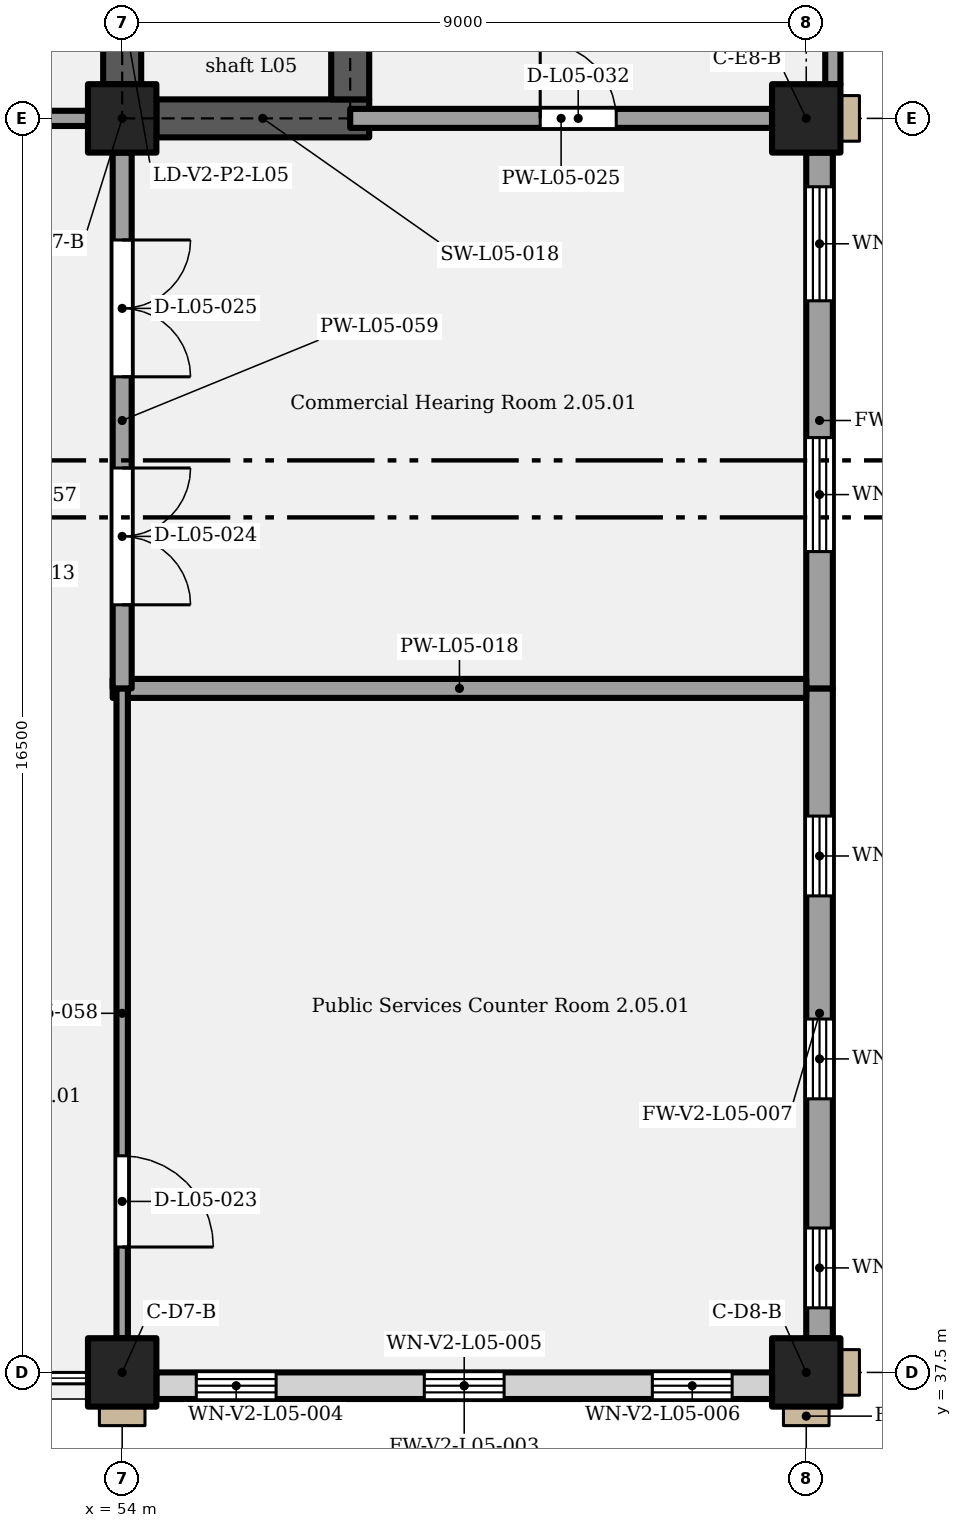
"""IFC4 building model, lengths in metres.
Left out: names, types, materials, properties, quantities, classifications, styles, units other than length and angle.
Written with IfcOpenShell. Run it as: python <this file> out.ifc"""

import sys

from ifc_helpers import new_model, si_unit, direction, frame, frame_2d, origin, origin_2d, place, context, subcontext, project, spatial, rectangle, extrude, element, fill, save


model = new_model("IFC4")
c1 = context("Model", 3, precision=1e-05, world=origin(), true_north=direction((0.0, 1.0)))
c2 = subcontext(c1, "Body", "Model", "MODEL_VIEW")
j1 = project(units=[si_unit("LENGTHUNIT", "METRE"), si_unit("PLANEANGLEUNIT", "RADIAN")], contexts=[c1])
p1 = place(None, origin())
s1 = spatial("IfcSite", under=j1, at=p1, CompositionType="ELEMENT")
p2 = place(p1, origin())
s2 = spatial("IfcBuilding", under=s1, at=p2, CompositionType="ELEMENT")
p3 = place(p2, frame((0.0, 0.0, 28.2)))
s3 = spatial("IfcBuildingStorey", under=s2, at=p3, CompositionType="ELEMENT", Elevation=28.2)
for number, where, z_axis, x_axis in (
    (1, (54.0, 37.5, 0.0), (0.0, 0.0, 1.0), (1.0, 0.0, 0.0)),
    (2, (63.0, 37.5, 0.0), (0.0, 0.0, 1.0), (1.0, 0.0, 0.0)),
    (3, (54.0, 54.0, 0.0), (0.0, 0.0, 1.0), (1.0, 0.0, 0.0)),
    (4, (63.0, 54.0, 0.0), (0.0, 0.0, 1.0), (1.0, 0.0, 0.0)),
):
    element("IfcColumn", number, at=place(p3, frame(where, z_axis=z_axis, x_axis=x_axis)), inside=s3, PredefinedType="COLUMN", context=c2, shape_type="SweptSolid", body=[
        extrude(rectangle(XDim=0.9, YDim=0.9, at=origin_2d()), origin(), (0.0, 0.0, 1.0), 5.4),
    ])
p4 = place(p3, frame((54.45, 54.0, 0.0), z_axis=(0.0, 0.0, 1.0), x_axis=(1.0, 0.0, 0.0)))
e5 = element("IfcWall", 5, at=p4, inside=s3, PredefinedType="SHEAR", context=c2, shape_type="SweptSolid", body=[
    extrude(rectangle(XDim=2.8, YDim=0.5, at=frame_2d((1.4, 0.0))), origin(), (0.0, 0.0, 1.0), 5.15),
])
p5 = place(p3, frame((57.0, 54.25, 0.0), z_axis=(0.0, 0.0, 1.0), x_axis=(0.0, 1.0, 0.0)))
e6 = element("IfcWall", 6, at=p5, inside=s3, PredefinedType="SHEAR", context=c2, shape_type="SweptSolid", body=[
    extrude(rectangle(XDim=2.5, YDim=0.5, at=frame_2d((1.25, 0.0))), origin(), (0.0, 0.0, 1.0), 5.15),
])
p6 = place(p3, frame((54.0, 54.45, 0.0), z_axis=(0.0, 0.0, 1.0), x_axis=(0.0, 1.0, 0.0)))
e7 = element("IfcWall", 7, at=p6, inside=s3, PredefinedType="SHEAR", context=c2, shape_type="SweptSolid", body=[
    extrude(rectangle(XDim=11.1, YDim=0.5, at=frame_2d((5.55, 0.0))), origin(), (0.0, 0.0, 1.0), 5.15),
])
p7 = place(p6, frame((0.5, 0.0, 0.0)))
e8 = element("IfcOpeningElement", 8, at=p7, cuts=e7, PredefinedType="OPENING", context=c2, shape_type="SweptSolid", body=[
    extrude(rectangle(XDim=1.1, YDim=2.1, at=frame_2d((0.55, 1.05))), frame((0.0, 0.26, 0.0), z_axis=(0.0, -1.0, 0.0), x_axis=(1.0, 0.0, 0.0)), (0.0, 0.0, 1.0), 0.52),
])
p8 = place(p6, frame((2.95, 0.0, 0.0)))
e9 = element("IfcOpeningElement", 9, at=p8, cuts=e7, PredefinedType="OPENING", context=c2, shape_type="SweptSolid", body=[
    extrude(rectangle(XDim=1.2, YDim=2.1, at=frame_2d((0.6, 1.05))), frame((0.0, 0.26, 0.0), z_axis=(0.0, -1.0, 0.0), x_axis=(1.0, 0.0, 0.0)), (0.0, 0.0, 1.0), 0.52),
])
p9 = place(p3, frame((54.45, 37.325, 0.0), z_axis=(0.0, 0.0, 1.0), x_axis=(1.0, 0.0, 0.0)))
e10 = element("IfcWall", 10, at=p9, inside=s3, PredefinedType="SOLIDWALL", context=c2, shape_type="SweptSolid", body=[
    extrude(rectangle(XDim=8.1, YDim=0.35, at=frame_2d((4.05, 0.0))), origin(), (0.0, 0.0, 1.0), 5.15),
])
p10 = place(p9, frame((0.525, 0.0, 1.05)))
e11 = element("IfcOpeningElement", 11, at=p10, cuts=e10, PredefinedType="OPENING", context=c2, shape_type="SweptSolid", body=[
    extrude(rectangle(XDim=1.05, YDim=2.4, at=frame_2d((0.525, 1.2))), frame((0.0, 0.185, 0.0), z_axis=(0.0, -1.0, 0.0), x_axis=(1.0, 0.0, 0.0)), (0.0, 0.0, 1.0), 0.37),
])
p11 = place(p9, frame((3.525, 0.0, 1.05)))
e12 = element("IfcOpeningElement", 12, at=p11, cuts=e10, PredefinedType="OPENING", context=c2, shape_type="SweptSolid", body=[
    extrude(rectangle(XDim=1.05, YDim=2.4, at=frame_2d((0.525, 1.2))), frame((0.0, 0.185, 0.0), z_axis=(0.0, -1.0, 0.0), x_axis=(1.0, 0.0, 0.0)), (0.0, 0.0, 1.0), 0.37),
])
p12 = place(p9, frame((6.525, 0.0, 1.05)))
e13 = element("IfcOpeningElement", 13, at=p12, cuts=e10, PredefinedType="OPENING", context=c2, shape_type="SweptSolid", body=[
    extrude(rectangle(XDim=1.05, YDim=2.4, at=frame_2d((0.525, 1.2))), frame((0.0, 0.185, 0.0), z_axis=(0.0, -1.0, 0.0), x_axis=(1.0, 0.0, 0.0)), (0.0, 0.0, 1.0), 0.37),
])
p13 = place(p3, frame((63.175, 37.95, 0.0), z_axis=(0.0, 0.0, 1.0), x_axis=(0.0, 1.0, 0.0)))
e14 = element("IfcWall", 14, at=p13, inside=s3, PredefinedType="SOLIDWALL", context=c2, shape_type="SweptSolid", body=[
    extrude(rectangle(XDim=8.55, YDim=0.35, at=frame_2d((4.275, 0.0))), origin(), (0.0, 0.0, 1.0), 5.15),
])
p14 = place(p13, frame((0.4, 0.0, 1.05)))
e15 = element("IfcOpeningElement", 15, at=p14, cuts=e14, PredefinedType="OPENING", context=c2, shape_type="SweptSolid", body=[
    extrude(rectangle(XDim=1.05, YDim=2.4, at=frame_2d((0.525, 1.2))), frame((0.0, 0.185, 0.0), z_axis=(0.0, -1.0, 0.0), x_axis=(1.0, 0.0, 0.0)), (0.0, 0.0, 1.0), 0.37),
])
p15 = place(p13, frame((3.15, 0.0, 1.05)))
e16 = element("IfcOpeningElement", 16, at=p15, cuts=e14, PredefinedType="OPENING", context=c2, shape_type="SweptSolid", body=[
    extrude(rectangle(XDim=1.05, YDim=2.4, at=frame_2d((0.525, 1.2))), frame((0.0, 0.185, 0.0), z_axis=(0.0, -1.0, 0.0), x_axis=(1.0, 0.0, 0.0)), (0.0, 0.0, 1.0), 0.37),
])
p16 = place(p13, frame((5.82, 0.0, 1.05)))
e17 = element("IfcOpeningElement", 17, at=p16, cuts=e14, PredefinedType="OPENING", context=c2, shape_type="SweptSolid", body=[
    extrude(rectangle(XDim=1.05, YDim=2.4, at=frame_2d((0.525, 1.2))), frame((0.0, 0.185, 0.0), z_axis=(0.0, -1.0, 0.0), x_axis=(1.0, 0.0, 0.0)), (0.0, 0.0, 1.0), 0.37),
])
p17 = place(p3, frame((63.175, 46.5, 0.0), z_axis=(0.0, 0.0, 1.0), x_axis=(0.0, 1.0, 0.0)))
e18 = element("IfcWall", 18, at=p17, inside=s3, PredefinedType="SOLIDWALL", context=c2, shape_type="SweptSolid", body=[
    extrude(rectangle(XDim=7.05, YDim=0.35, at=frame_2d((3.525, 0.0))), origin(), (0.0, 0.0, 1.0), 5.15),
])
p18 = place(p17, frame((1.8, 0.0, 1.05)))
e19 = element("IfcOpeningElement", 19, at=p18, cuts=e18, PredefinedType="OPENING", context=c2, shape_type="SweptSolid", body=[
    extrude(rectangle(XDim=1.5, YDim=3.5, at=frame_2d((0.75, 1.75))), frame((0.0, 0.185, 0.0), z_axis=(0.0, -1.0, 0.0), x_axis=(1.0, 0.0, 0.0)), (0.0, 0.0, 1.0), 0.37),
])
p19 = place(p17, frame((5.1, 0.0, 1.05)))
e20 = element("IfcOpeningElement", 20, at=p19, cuts=e18, PredefinedType="OPENING", context=c2, shape_type="SweptSolid", body=[
    extrude(rectangle(XDim=1.5, YDim=3.5, at=frame_2d((0.75, 1.75))), frame((0.0, 0.185, 0.0), z_axis=(0.0, -1.0, 0.0), x_axis=(1.0, 0.0, 0.0)), (0.0, 0.0, 1.0), 0.37),
])
p20 = place(p3, frame((63.35, 54.45, 0.0), z_axis=(0.0, 0.0, 1.0), x_axis=(0.0, 1.0, 0.0)))
e21 = element("IfcWall", 21, at=p20, inside=s3, PredefinedType="SOLIDWALL", context=c2, shape_type="SweptSolid", body=[
    extrude(rectangle(XDim=2.55, YDim=0.2, at=frame_2d((1.275, 0.0))), origin(), (0.0, 0.0, 1.0), 5.15),
])
p21 = place(p20, frame((0.525, 0.0, 1.05)))
e22 = element("IfcOpeningElement", 22, at=p21, cuts=e21, PredefinedType="OPENING", context=c2, shape_type="SweptSolid", body=[
    extrude(rectangle(XDim=1.05, YDim=2.4, at=frame_2d((0.525, 1.2))), frame((0.0, 0.11, 0.0), z_axis=(0.0, -1.0, 0.0), x_axis=(1.0, 0.0, 0.0)), (0.0, 0.0, 1.0), 0.22),
])
p22 = place(p3, frame((53.875, 46.5, 0.0), z_axis=(0.0, 0.0, 1.0), x_axis=(1.0, 0.0, 0.0)))
e23 = element("IfcWall", 23, at=p22, inside=s3, PredefinedType="PARTITIONING", context=c2, shape_type="SweptSolid", body=[
    extrude(rectangle(XDim=9.125, YDim=0.25, at=frame_2d((4.562, 0.0))), origin(), (0.0, 0.0, 1.0), 5.15),
])
p23 = place(p3, frame((49.5, 54.0, 0.0), z_axis=(0.0, 0.0, 1.0), x_axis=(1.0, 0.0, 0.0)))
e24 = element("IfcWall", 24, at=p23, inside=s3, PredefinedType="PARTITIONING", context=c2, shape_type="SweptSolid", body=[
    extrude(rectangle(XDim=4.05, YDim=0.2, at=frame_2d((2.025, 0.0))), origin(), (0.0, 0.0, 1.0), 4.4),
])
p24 = place(p23, frame((1.35, 0.0, 0.0)))
e25 = element("IfcOpeningElement", 25, at=p24, cuts=e24, PredefinedType="OPENING", context=c2, shape_type="SweptSolid", body=[
    extrude(rectangle(XDim=1.8, YDim=2.1, at=frame_2d((0.9, 1.05))), frame((0.0, 0.11, 0.0), z_axis=(0.0, -1.0, 0.0), x_axis=(1.0, 0.0, 0.0)), (0.0, 0.0, 1.0), 0.22),
])
p25 = place(p3, frame((57.0, 54.0, 0.0), z_axis=(0.0, 0.0, 1.0), x_axis=(1.0, 0.0, 0.0)))
e26 = element("IfcWall", 26, at=p25, inside=s3, PredefinedType="PARTITIONING", context=c2, shape_type="SweptSolid", body=[
    extrude(rectangle(XDim=5.55, YDim=0.25, at=frame_2d((2.775, 0.0))), origin(), (0.0, 0.0, 1.0), 4.4),
])
p26 = place(p25, frame((2.5, 0.0, 0.0)))
e27 = element("IfcOpeningElement", 27, at=p26, cuts=e26, PredefinedType="OPENING", context=c2, shape_type="SweptSolid", body=[
    extrude(rectangle(XDim=1.0, YDim=2.1, at=frame_2d((0.5, 1.05))), frame((0.0, 0.135, 0.0), z_axis=(0.0, -1.0, 0.0), x_axis=(1.0, 0.0, 0.0)), (0.0, 0.0, 1.0), 0.27),
])
p27 = place(p3, frame((54.0, 37.95, 0.0), z_axis=(0.0, 0.0, 1.0), x_axis=(0.0, 1.0, 0.0)))
e28 = element("IfcWall", 28, at=p27, inside=s3, PredefinedType="PARTITIONING", context=c2, shape_type="SweptSolid", body=[
    extrude(rectangle(XDim=8.55, YDim=0.15, at=frame_2d((4.275, 0.0))), origin(), (0.0, 0.0, 1.0), 4.2),
])
p28 = place(p27, frame((2.4, 0.0, 0.0), z_axis=(0.0, 0.0, 1.0), x_axis=(-1.0, 0.0, 0.0)))
e29 = element("IfcOpeningElement", 29, at=p28, cuts=e28, PredefinedType="OPENING", context=c2, shape_type="SweptSolid", body=[
    extrude(rectangle(XDim=1.2, YDim=2.1, at=frame_2d((0.6, 1.05))), frame((0.0, 0.085, 0.0), z_axis=(0.0, -1.0, 0.0), x_axis=(1.0, 0.0, 0.0)), (0.0, 0.0, 1.0), 0.17),
])
p29 = place(p3, frame((54.0, 46.5, 0.0), z_axis=(0.0, 0.0, 1.0), x_axis=(0.0, 1.0, 0.0)))
e30 = element("IfcWall", 30, at=p29, inside=s3, PredefinedType="PARTITIONING", context=c2, shape_type="SweptSolid", body=[
    extrude(rectangle(XDim=7.05, YDim=0.25, at=frame_2d((3.525, 0.0))), origin(), (0.0, 0.0, 1.0), 4.2),
])
p30 = place(p29, frame((2.9, 0.0, 0.0), z_axis=(0.0, 0.0, 1.0), x_axis=(-1.0, 0.0, 0.0)))
e31 = element("IfcOpeningElement", 31, at=p30, cuts=e30, PredefinedType="OPENING", context=c2, shape_type="SweptSolid", body=[
    extrude(rectangle(XDim=1.8, YDim=2.4, at=frame_2d((0.9, 1.2))), frame((0.0, 0.135, 0.0), z_axis=(0.0, -1.0, 0.0), x_axis=(1.0, 0.0, 0.0)), (0.0, 0.0, 1.0), 0.27),
])
p31 = place(p29, frame((5.9, 0.0, 0.0), z_axis=(0.0, 0.0, 1.0), x_axis=(-1.0, 0.0, 0.0)))
e32 = element("IfcOpeningElement", 32, at=p31, cuts=e30, PredefinedType="OPENING", context=c2, shape_type="SweptSolid", body=[
    extrude(rectangle(XDim=1.8, YDim=2.4, at=frame_2d((0.9, 1.2))), frame((0.0, 0.135, 0.0), z_axis=(0.0, -1.0, 0.0), x_axis=(1.0, 0.0, 0.0)), (0.0, 0.0, 1.0), 0.27),
])
p32 = place(p10, origin())
e33 = element("IfcWindow", 33, at=p32, inside=s3, PartitioningType="SINGLE_PANEL", PredefinedType="WINDOW", context=c2, shape_type="SweptSolid", body=[
    extrude(rectangle(XDim=1.05, YDim=2.4, at=frame_2d((0.525, 1.2))), frame((0.0, 0.03, 0.0), z_axis=(0.0, -1.0, 0.0), x_axis=(1.0, 0.0, 0.0)), (0.0, 0.0, 1.0), 0.06),
])
fill(e11, e33)
p33 = place(p11, origin())
e34 = element("IfcWindow", 34, at=p33, inside=s3, PartitioningType="SINGLE_PANEL", PredefinedType="WINDOW", context=c2, shape_type="SweptSolid", body=[
    extrude(rectangle(XDim=1.05, YDim=2.4, at=frame_2d((0.525, 1.2))), frame((0.0, 0.03, 0.0), z_axis=(0.0, -1.0, 0.0), x_axis=(1.0, 0.0, 0.0)), (0.0, 0.0, 1.0), 0.06),
])
fill(e12, e34)
p34 = place(p12, origin())
e35 = element("IfcWindow", 35, at=p34, inside=s3, PartitioningType="SINGLE_PANEL", PredefinedType="WINDOW", context=c2, shape_type="SweptSolid", body=[
    extrude(rectangle(XDim=1.05, YDim=2.4, at=frame_2d((0.525, 1.2))), frame((0.0, 0.03, 0.0), z_axis=(0.0, -1.0, 0.0), x_axis=(1.0, 0.0, 0.0)), (0.0, 0.0, 1.0), 0.06),
])
fill(e13, e35)
p35 = place(p14, origin())
e36 = element("IfcWindow", 36, at=p35, inside=s3, PartitioningType="SINGLE_PANEL", PredefinedType="WINDOW", context=c2, shape_type="SweptSolid", body=[
    extrude(rectangle(XDim=1.05, YDim=2.4, at=frame_2d((0.525, 1.2))), frame((0.0, 0.03, 0.0), z_axis=(0.0, -1.0, 0.0), x_axis=(1.0, 0.0, 0.0)), (0.0, 0.0, 1.0), 0.06),
])
fill(e15, e36)
p36 = place(p15, origin())
e37 = element("IfcWindow", 37, at=p36, inside=s3, PartitioningType="SINGLE_PANEL", PredefinedType="WINDOW", context=c2, shape_type="SweptSolid", body=[
    extrude(rectangle(XDim=1.05, YDim=2.4, at=frame_2d((0.525, 1.2))), frame((0.0, 0.03, 0.0), z_axis=(0.0, -1.0, 0.0), x_axis=(1.0, 0.0, 0.0)), (0.0, 0.0, 1.0), 0.06),
])
fill(e16, e37)
p37 = place(p16, origin())
e38 = element("IfcWindow", 38, at=p37, inside=s3, PartitioningType="SINGLE_PANEL", PredefinedType="WINDOW", context=c2, shape_type="SweptSolid", body=[
    extrude(rectangle(XDim=1.05, YDim=2.4, at=frame_2d((0.525, 1.2))), frame((0.0, 0.03, 0.0), z_axis=(0.0, -1.0, 0.0), x_axis=(1.0, 0.0, 0.0)), (0.0, 0.0, 1.0), 0.06),
])
fill(e17, e38)
p38 = place(p18, origin())
e39 = element("IfcWindow", 39, at=p38, inside=s3, PartitioningType="SINGLE_PANEL", PredefinedType="WINDOW", context=c2, shape_type="SweptSolid", body=[
    extrude(rectangle(XDim=1.5, YDim=3.5, at=frame_2d((0.75, 1.75))), frame((0.0, 0.03, 0.0), z_axis=(0.0, -1.0, 0.0), x_axis=(1.0, 0.0, 0.0)), (0.0, 0.0, 1.0), 0.06),
])
fill(e19, e39)
p39 = place(p19, origin())
e40 = element("IfcWindow", 40, at=p39, inside=s3, PartitioningType="SINGLE_PANEL", PredefinedType="WINDOW", context=c2, shape_type="SweptSolid", body=[
    extrude(rectangle(XDim=1.5, YDim=3.5, at=frame_2d((0.75, 1.75))), frame((0.0, 0.03, 0.0), z_axis=(0.0, -1.0, 0.0), x_axis=(1.0, 0.0, 0.0)), (0.0, 0.0, 1.0), 0.06),
])
fill(e20, e40)
p40 = place(p28, origin())
e41 = element("IfcDoor", 41, at=p40, inside=s3, OperationType="SINGLE_SWING_RIGHT", PredefinedType="DOOR", context=c2, shape_type="SweptSolid", body=[
    extrude(rectangle(XDim=1.2, YDim=2.1, at=frame_2d((0.6, 1.05))), frame((0.0, 0.025, 0.0), z_axis=(0.0, -1.0, 0.0), x_axis=(1.0, 0.0, 0.0)), (0.0, 0.0, 1.0), 0.05),
])
fill(e29, e41)
p41 = place(p30, origin())
e42 = element("IfcDoor", 42, at=p41, inside=s3, OperationType="DOUBLE_DOOR_SINGLE_SWING", PredefinedType="DOOR", context=c2, shape_type="SweptSolid", body=[
    extrude(rectangle(XDim=1.8, YDim=2.4, at=frame_2d((0.9, 1.2))), frame((0.0, 0.025, 0.0), z_axis=(0.0, -1.0, 0.0), x_axis=(1.0, 0.0, 0.0)), (0.0, 0.0, 1.0), 0.05),
])
fill(e31, e42)
p42 = place(p31, origin())
e43 = element("IfcDoor", 43, at=p42, inside=s3, OperationType="DOUBLE_DOOR_SINGLE_SWING", PredefinedType="DOOR", context=c2, shape_type="SweptSolid", body=[
    extrude(rectangle(XDim=1.8, YDim=2.4, at=frame_2d((0.9, 1.2))), frame((0.0, 0.025, 0.0), z_axis=(0.0, -1.0, 0.0), x_axis=(1.0, 0.0, 0.0)), (0.0, 0.0, 1.0), 0.05),
])
fill(e32, e43)
p43 = place(p26, origin())
e44 = element("IfcDoor", 44, at=p43, inside=s3, OperationType="SINGLE_SWING_LEFT", PredefinedType="DOOR", context=c2, shape_type="SweptSolid", body=[
    extrude(rectangle(XDim=1.0, YDim=2.1, at=frame_2d((0.5, 1.05))), frame((0.0, 0.025, 0.0), z_axis=(0.0, -1.0, 0.0), x_axis=(1.0, 0.0, 0.0)), (0.0, 0.0, 1.0), 0.05),
])
fill(e27, e44)
save(model, sys.argv[1])
